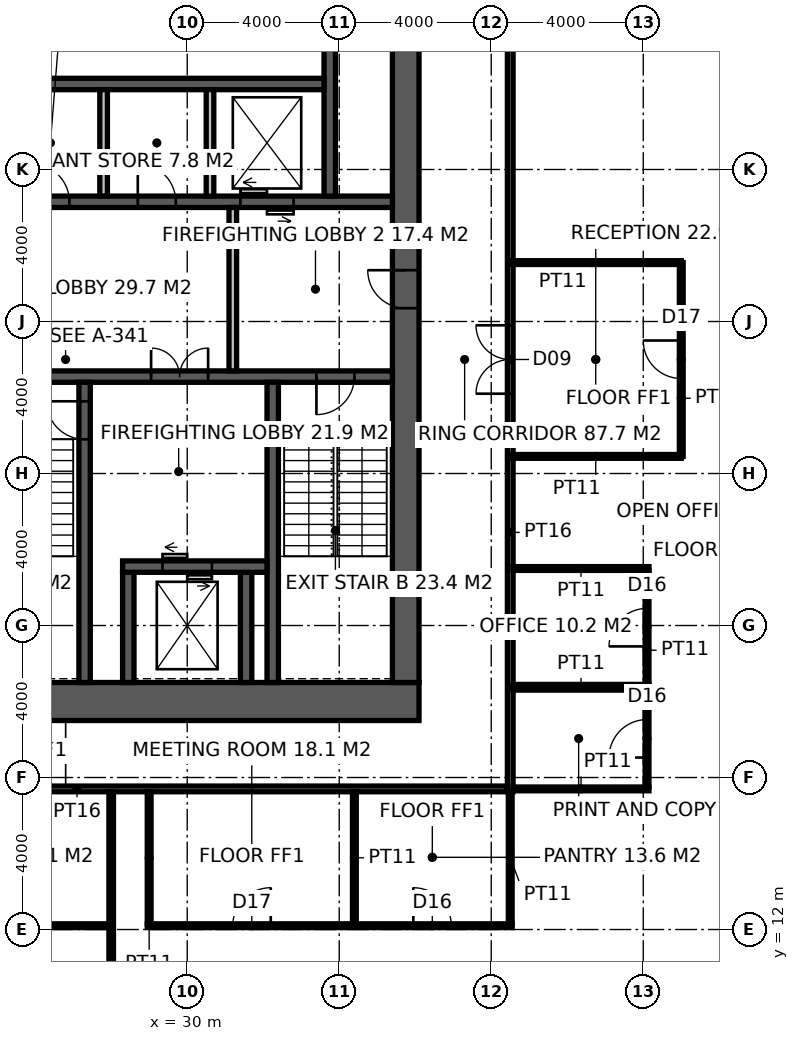
"""IFC4 building model, lengths in metres.
Left out: names, types, materials, properties, quantities, classifications, styles, units other than length and angle.
Written with IfcOpenShell. Run it as: python <this file> out.ifc"""

import sys

from ifc_helpers import new_model, si_unit, direction, frame, frame_2d, origin, place, context, subcontext, project, spatial, rectangle, extrude, element, fill, save


model = new_model("IFC4")
c1 = context("Model", 3, precision=1e-05, world=origin(), true_north=direction((0.0, 1.0)))
c2 = subcontext(c1, "Body", "Model", "MODEL_VIEW")
j1 = project(units=[si_unit("LENGTHUNIT", "METRE"), si_unit("PLANEANGLEUNIT", "RADIAN")], contexts=[c1])
p1 = place(None, origin())
s1 = spatial("IfcSite", under=j1, at=p1, CompositionType="ELEMENT")
p2 = place(p1, origin())
s2 = spatial("IfcBuilding", under=s1, at=p2, CompositionType="ELEMENT")
p3 = place(p2, frame((0.0, 0.0, 266.2)))
s3 = spatial("IfcBuildingStorey", under=s2, at=p3, CompositionType="ELEMENT", Elevation=266.2)
p4 = place(p3, frame((18.5, 18.0, -0.15), z_axis=(0.0, 0.0, 1.0), x_axis=(1.0, 0.0, 0.0)))
e1 = element("IfcWall", 1, at=p4, inside=s3, PredefinedType="SHEAR", context=c2, shape_type="SweptSolid", body=[
    extrude(rectangle(XDim=17.6, YDim=1.0, at=frame_2d((8.8, 0.0))), origin(), (0.0, 0.0, 1.0), 4.0),
])
p5 = place(p4, frame((3.45, 0.0, 0.15)))
e2 = element("IfcOpeningElement", 2, at=p5, cuts=e1, PredefinedType="OPENING", context=c2, shape_type="SweptSolid", body=[
    extrude(rectangle(XDim=1.5, YDim=2.4, at=frame_2d((0.75, 1.2))), frame((0.0, 0.51, 0.0), z_axis=(0.0, -1.0, 0.0), x_axis=(1.0, 0.0, 0.0)), (0.0, 0.0, 1.0), 1.02),
])
p6 = place(p3, frame((35.75, 18.5, -0.15), z_axis=(0.0, 0.0, 1.0), x_axis=(0.0, 1.0, 0.0)))
e3 = element("IfcWall", 3, at=p6, inside=s3, PredefinedType="SHEAR", context=c2, shape_type="SweptSolid", body=[
    extrude(rectangle(XDim=17.0, YDim=0.7, at=frame_2d((8.5, 0.0))), origin(), (0.0, 0.0, 1.0), 4.0),
])
p7 = place(p6, frame((9.85, 0.0, 0.15)))
e4 = element("IfcOpeningElement", 4, at=p7, cuts=e3, PredefinedType="OPENING", context=c2, shape_type="SweptSolid", body=[
    extrude(rectangle(XDim=1.0, YDim=2.2, at=frame_2d((0.5, 1.1))), frame((0.0, 0.36, 0.0), z_axis=(0.0, -1.0, 0.0), x_axis=(1.0, 0.0, 0.0)), (0.0, 0.0, 1.0), 0.72),
])
p8 = place(p3, frame((24.15, 26.55, -0.15), z_axis=(0.0, 0.0, 1.0), x_axis=(1.0, 0.0, 0.0)))
e5 = element("IfcWall", 5, at=p8, inside=s3, PredefinedType="SHEAR", context=c2, shape_type="SweptSolid", body=[
    extrude(rectangle(XDim=11.25, YDim=0.3, at=frame_2d((5.625, 0.0))), origin(), (0.0, 0.0, 1.0), 4.0),
])
p9 = place(p8, frame((9.25, 0.0, 0.15)))
e6 = element("IfcOpeningElement", 6, at=p9, cuts=e5, PredefinedType="OPENING", context=c2, shape_type="SweptSolid", body=[
    extrude(rectangle(XDim=1.0, YDim=2.2, at=frame_2d((0.5, 1.1))), frame((0.0, 0.16, 0.0), z_axis=(0.0, -1.0, 0.0), x_axis=(1.0, 0.0, 0.0)), (0.0, 0.0, 1.0), 0.32),
])
p10 = place(p8, frame((4.9, 0.0, 0.15)))
e7 = element("IfcOpeningElement", 7, at=p10, cuts=e5, PredefinedType="OPENING", context=c2, shape_type="SweptSolid", body=[
    extrude(rectangle(XDim=1.5, YDim=2.4, at=frame_2d((0.75, 1.2))), frame((0.0, 0.16, 0.0), z_axis=(0.0, -1.0, 0.0), x_axis=(1.0, 0.0, 0.0)), (0.0, 0.0, 1.0), 0.32),
])
p11 = place(p3, frame((27.3, 18.5, -0.15), z_axis=(0.0, 0.0, 1.0), x_axis=(0.0, 1.0, 0.0)))
e8 = element("IfcWall", 8, at=p11, inside=s3, PredefinedType="SHEAR", context=c2, shape_type="SweptSolid", body=[
    extrude(rectangle(XDim=7.9, YDim=0.3, at=frame_2d((3.95, 0.0))), origin(), (0.0, 0.0, 1.0), 4.0),
])
p12 = place(p11, frame((6.4, 0.0, 0.15)))
e9 = element("IfcOpeningElement", 9, at=p12, cuts=e8, PredefinedType="OPENING", context=c2, shape_type="SweptSolid", body=[
    extrude(rectangle(XDim=1.0, YDim=2.2, at=frame_2d((0.5, 1.1))), frame((0.0, 0.16, 0.0), z_axis=(0.0, -1.0, 0.0), x_axis=(1.0, 0.0, 0.0)), (0.0, 0.0, 1.0), 0.32),
])
p13 = place(p3, frame((32.25, 18.5, -0.15), z_axis=(0.0, 0.0, 1.0), x_axis=(0.0, 1.0, 0.0)))
e10 = element("IfcWall", 10, at=p13, inside=s3, PredefinedType="SHEAR", context=c2, shape_type="SweptSolid", body=[
    extrude(rectangle(XDim=7.9, YDim=0.3, at=frame_2d((3.95, 0.0))), origin(), (0.0, 0.0, 1.0), 4.0),
])
for number, where, z_axis, x_axis in (
    (11, (28.45, 18.5, -0.15), (0.0, 0.0, 1.0), (0.0, 1.0, 0.0)),
    (12, (31.55, 18.5, -0.15), (0.0, 0.0, 1.0), (0.0, 1.0, 0.0)),
):
    element("IfcWall", number, at=place(p3, frame(where, z_axis=z_axis, x_axis=x_axis)), inside=s3, PredefinedType="SHEAR", context=c2, shape_type="SweptSolid", body=[
        extrude(rectangle(XDim=2.9, YDim=0.3, at=frame_2d((1.45, 0.0))), origin(), (0.0, 0.0, 1.0), 4.0),
    ])
p14 = place(p3, frame((28.3, 21.55, -0.15), z_axis=(0.0, 0.0, 1.0), x_axis=(1.0, 0.0, 0.0)))
e13 = element("IfcWall", 13, at=p14, inside=s3, PredefinedType="SHEAR", context=c2, shape_type="SweptSolid", body=[
    extrude(rectangle(XDim=3.8, YDim=0.3, at=frame_2d((1.9, 0.0))), origin(), (0.0, 0.0, 1.0), 4.0),
])
p15 = place(p14, frame((1.05, 0.0, 0.15)))
e14 = element("IfcOpeningElement", 14, at=p15, cuts=e13, PredefinedType="OPENING", context=c2, shape_type="SweptSolid", body=[
    extrude(rectangle(XDim=1.3, YDim=2.4, at=frame_2d((0.65, 1.2))), frame((0.0, 0.16, 0.0), z_axis=(0.0, -1.0, 0.0), x_axis=(1.0, 0.0, 0.0)), (0.0, 0.0, 1.0), 0.32),
])
p16 = place(p3, frame((24.15, 31.15, -0.15), z_axis=(0.0, 0.0, 1.0), x_axis=(1.0, 0.0, 0.0)))
e15 = element("IfcWall", 15, at=p16, inside=s3, PredefinedType="SHEAR", context=c2, shape_type="SweptSolid", body=[
    extrude(rectangle(XDim=11.25, YDim=0.3, at=frame_2d((5.625, 0.0))), origin(), (0.0, 0.0, 1.0), 4.0),
])
p17 = place(p16, frame((1.75, 0.0, 0.15)))
e16 = element("IfcOpeningElement", 16, at=p17, cuts=e15, PredefinedType="OPENING", context=c2, shape_type="SweptSolid", body=[
    extrude(rectangle(XDim=1.0, YDim=2.2, at=frame_2d((0.5, 1.1))), frame((0.0, 0.16, 0.0), z_axis=(0.0, -1.0, 0.0), x_axis=(1.0, 0.0, 0.0)), (0.0, 0.0, 1.0), 0.32),
])
p18 = place(p16, frame((4.55, 0.0, 0.15)))
e17 = element("IfcOpeningElement", 17, at=p18, cuts=e15, PredefinedType="OPENING", context=c2, shape_type="SweptSolid", body=[
    extrude(rectangle(XDim=1.0, YDim=2.2, at=frame_2d((0.5, 1.1))), frame((0.0, 0.16, 0.0), z_axis=(0.0, -1.0, 0.0), x_axis=(1.0, 0.0, 0.0)), (0.0, 0.0, 1.0), 0.32),
])
p19 = place(p16, frame((7.25, 0.0, 0.15)))
e18 = element("IfcOpeningElement", 18, at=p19, cuts=e15, PredefinedType="OPENING", context=c2, shape_type="SweptSolid", body=[
    extrude(rectangle(XDim=1.4, YDim=2.4, at=frame_2d((0.7, 1.2))), frame((0.0, 0.16, 0.0), z_axis=(0.0, -1.0, 0.0), x_axis=(1.0, 0.0, 0.0)), (0.0, 0.0, 1.0), 0.32),
])
p20 = place(p3, frame((33.75, 31.3, -0.15), z_axis=(0.0, 0.0, 1.0), x_axis=(0.0, 1.0, 0.0)))
e19 = element("IfcWall", 19, at=p20, inside=s3, PredefinedType="SHEAR", context=c2, shape_type="SweptSolid", body=[
    extrude(rectangle(XDim=4.2, YDim=0.3, at=frame_2d((2.1, 0.0))), origin(), (0.0, 0.0, 1.0), 4.0),
])
p21 = place(p3, frame((25.0, 34.25, -0.15), z_axis=(0.0, 0.0, 1.0), x_axis=(1.0, 0.0, 0.0)))
e20 = element("IfcWall", 20, at=p21, inside=s3, PredefinedType="SHEAR", context=c2, shape_type="SweptSolid", body=[
    extrude(rectangle(XDim=8.6, YDim=0.3, at=frame_2d((4.3, 0.0))), origin(), (0.0, 0.0, 1.0), 4.0),
])
p22 = place(p3, frame((27.8, 31.3, 0.0), z_axis=(0.0, 0.0, 1.0), x_axis=(0.0, 1.0, 0.0)))
e21 = element("IfcWall", 21, at=p22, inside=s3, PredefinedType="SOLIDWALL", context=c2, shape_type="SweptSolid", body=[
    extrude(rectangle(XDim=2.8, YDim=0.2, at=frame_2d((1.4, 0.0))), origin(), (0.0, 0.0, 1.0), 3.85),
])
p23 = place(p3, frame((30.6, 31.3, -0.15), z_axis=(0.0, 0.0, 1.0), x_axis=(0.0, 1.0, 0.0)))
e22 = element("IfcWall", 22, at=p23, inside=s3, PredefinedType="SOLIDWALL", context=c2, shape_type="SweptSolid", body=[
    extrude(rectangle(XDim=2.8, YDim=0.2, at=frame_2d((1.4, 0.0))), origin(), (0.0, 0.0, 1.0), 4.0),
])
p24 = place(p3, frame((31.2, 26.7, 0.0), z_axis=(0.0, 0.0, 1.0), x_axis=(0.0, 1.0, 0.0)))
e23 = element("IfcWall", 23, at=p24, inside=s3, PredefinedType="SOLIDWALL", context=c2, shape_type="SweptSolid", body=[
    extrude(rectangle(XDim=4.3, YDim=0.2, at=frame_2d((2.15, 0.0))), origin(), (0.0, 0.0, 1.0), 3.85),
])
p25 = place(p3, frame((38.5, 15.625, 0.0), z_axis=(0.0, 0.0, 1.0), x_axis=(0.0, 1.0, 0.0)))
e24 = element("IfcWall", 24, at=p25, inside=s3, PredefinedType="PARTITIONING", context=c2, shape_type="SweptSolid", body=[
    extrude(rectangle(XDim=22.75, YDim=0.15, at=frame_2d((11.375, 0.0))), origin(), (0.0, 0.0, 1.0), 2.65),
])
p26 = place(p25, frame((10.475, 0.0, 0.0)))
e25 = element("IfcOpeningElement", 25, at=p26, cuts=e24, PredefinedType="OPENING", context=c2, shape_type="SweptSolid", body=[
    extrude(rectangle(XDim=1.8, YDim=2.4, at=frame_2d((0.9, 1.2))), frame((0.0, 0.085, 0.0), z_axis=(0.0, -1.0, 0.0), x_axis=(1.0, 0.0, 0.0)), (0.0, 0.0, 1.0), 0.17),
])
p27 = place(p3, frame((15.775, 15.7, 0.0), z_axis=(0.0, 0.0, 1.0), x_axis=(1.0, 0.0, 0.0)))
e26 = element("IfcWall", 26, at=p27, inside=s3, PredefinedType="PARTITIONING", context=c2, shape_type="SweptSolid", body=[
    extrude(rectangle(XDim=22.65, YDim=0.15, at=frame_2d((11.325, 0.0))), origin(), (0.0, 0.0, 1.0), 3.85),
])
p28 = place(p3, frame((28.0, 4.3, 0.0), z_axis=(0.0, 0.0, 1.0), x_axis=(0.0, 1.0, 0.0)))
e27 = element("IfcWall", 27, at=p28, inside=s3, PredefinedType="PARTITIONING", context=c2, shape_type="SweptSolid", body=[
    extrude(rectangle(XDim=11.325, YDim=0.12, at=frame_2d((5.663, 0.0))), origin(), (0.0, 0.0, 1.0), 3.85),
])
p29 = place(p3, frame((15.65, 12.1, 0.0), z_axis=(0.0, 0.0, 1.0), x_axis=(1.0, 0.0, 0.0)))
e28 = element("IfcWall", 28, at=p29, inside=s3, PredefinedType="PARTITIONING", context=c2, shape_type="SweptSolid", body=[
    extrude(rectangle(XDim=12.289, YDim=0.1, at=frame_2d((6.145, 0.0))), origin(), (0.0, 0.0, 1.0), 3.85),
])
p30 = place(p29, frame((2.75, 0.0, 0.0)))
e29 = element("IfcOpeningElement", 29, at=p30, cuts=e28, PredefinedType="OPENING", context=c2, shape_type="SweptSolid", body=[
    extrude(rectangle(XDim=1.8, YDim=2.4, at=frame_2d((0.9, 1.2))), frame((0.0, 0.06, 0.0), z_axis=(0.0, -1.0, 0.0), x_axis=(1.0, 0.0, 0.0)), (0.0, 0.0, 1.0), 0.12),
])
p31 = place(p29, frame((9.3, 0.0, 0.0)))
e30 = element("IfcOpeningElement", 30, at=p31, cuts=e28, PredefinedType="OPENING", context=c2, shape_type="SweptSolid", body=[
    extrude(rectangle(XDim=1.0, YDim=2.2, at=frame_2d((0.5, 1.1))), frame((0.0, 0.06, 0.0), z_axis=(0.0, -1.0, 0.0), x_axis=(1.0, 0.0, 0.0)), (0.0, 0.0, 1.0), 0.12),
])
p32 = place(p3, frame((28.949, 12.1, 0.0), z_axis=(0.0, 0.0, 1.0), x_axis=(1.0, 0.0, 0.0)))
e31 = element("IfcWall", 31, at=p32, inside=s3, PredefinedType="PARTITIONING", context=c2, shape_type="SweptSolid", body=[
    extrude(rectangle(XDim=9.601, YDim=0.1, at=frame_2d((4.801, 0.0))), origin(), (0.0, 0.0, 1.0), 3.85),
])
p33 = place(p32, frame((2.25, 0.0, 0.0)))
e32 = element("IfcOpeningElement", 32, at=p33, cuts=e31, PredefinedType="OPENING", context=c2, shape_type="SweptSolid", body=[
    extrude(rectangle(XDim=1.0, YDim=2.2, at=frame_2d((0.5, 1.1))), frame((0.0, 0.06, 0.0), z_axis=(0.0, -1.0, 0.0), x_axis=(1.0, 0.0, 0.0)), (0.0, 0.0, 1.0), 0.12),
])
p34 = place(p32, frame((7.0, 0.0, 0.0)))
e33 = element("IfcOpeningElement", 33, at=p34, cuts=e31, PredefinedType="OPENING", context=c2, shape_type="SweptSolid", body=[
    extrude(rectangle(XDim=1.0, YDim=2.2, at=frame_2d((0.5, 1.1))), frame((0.0, 0.06, 0.0), z_axis=(0.0, -1.0, 0.0), x_axis=(1.0, 0.0, 0.0)), (0.0, 0.0, 1.0), 0.12),
])
for number, where, z_axis, x_axis in (
    (34, (38.575, 15.7, 0.0), (0.0, 0.0, 1.0), (1.0, 0.0, 0.0)),
    (35, (38.575, 18.35, 0.0), (0.0, 0.0, 1.0), (1.0, 0.0, 0.0)),
    (36, (38.575, 18.4, 0.0), (0.0, 0.0, 1.0), (1.0, 0.0, 0.0)),
    (37, (38.575, 21.5, 0.0), (0.0, 0.0, 1.0), (1.0, 0.0, 0.0)),
):
    element("IfcWall", number, at=place(p3, frame(where, z_axis=z_axis, x_axis=x_axis)), inside=s3, PredefinedType="PARTITIONING", context=c2, shape_type="SweptSolid", body=[
        extrude(rectangle(XDim=3.575, YDim=0.1, at=frame_2d((1.788, 0.0))), origin(), (0.0, 0.0, 1.0), 3.85),
    ])
for number, where, z_axis, x_axis in (
    (38, (28.999, 12.15, 0.0), (0.0, 0.0, 1.0), (0.0, 1.0, 0.0)),
    (39, (34.399, 12.15, 0.0), (0.0, 0.0, 1.0), (0.0, 1.0, 0.0)),
    (40, (38.5, 12.15, 0.0), (0.0, 0.0, 1.0), (0.0, 1.0, 0.0)),
):
    element("IfcWall", number, at=place(p3, frame(where, z_axis=z_axis, x_axis=x_axis)), inside=s3, PredefinedType="PARTITIONING", context=c2, shape_type="SweptSolid", body=[
        extrude(rectangle(XDim=3.475, YDim=0.1, at=frame_2d((1.738, 0.0))), origin(), (0.0, 0.0, 1.0), 3.85),
    ])
p35 = place(p3, frame((42.1, 15.75, 0.0), z_axis=(0.0, 0.0, 1.0), x_axis=(0.0, 1.0, 0.0)))
e41 = element("IfcWall", 41, at=p35, inside=s3, PredefinedType="PARTITIONING", context=c2, shape_type="SweptSolid", body=[
    extrude(rectangle(XDim=2.55, YDim=0.1, at=frame_2d((1.275, 0.0))), origin(), (0.0, 0.0, 1.0), 2.95),
])
p36 = place(p35, frame((0.775, 0.0, 0.0)))
e42 = element("IfcOpeningElement", 42, at=p36, cuts=e41, PredefinedType="OPENING", context=c2, shape_type="SweptSolid", body=[
    extrude(rectangle(XDim=1.0, YDim=2.2, at=frame_2d((0.5, 1.1))), frame((0.0, 0.06, 0.0), z_axis=(0.0, -1.0, 0.0), x_axis=(1.0, 0.0, 0.0)), (0.0, 0.0, 1.0), 0.12),
])
p37 = place(p3, frame((42.1, 18.45, 0.0), z_axis=(0.0, 0.0, 1.0), x_axis=(0.0, 1.0, 0.0)))
e43 = element("IfcWall", 43, at=p37, inside=s3, PredefinedType="PARTITIONING", context=c2, shape_type="SweptSolid", body=[
    extrude(rectangle(XDim=3.0, YDim=0.1, at=frame_2d((1.5, 0.0))), origin(), (0.0, 0.0, 1.0), 2.95),
])
p38 = place(p37, frame((1.0, 0.0, 0.0)))
e44 = element("IfcOpeningElement", 44, at=p38, cuts=e43, PredefinedType="OPENING", context=c2, shape_type="SweptSolid", body=[
    extrude(rectangle(XDim=1.0, YDim=2.2, at=frame_2d((0.5, 1.1))), frame((0.0, 0.06, 0.0), z_axis=(0.0, -1.0, 0.0), x_axis=(1.0, 0.0, 0.0)), (0.0, 0.0, 1.0), 0.12),
])
p39 = place(p3, frame((38.5, 24.45, 0.0), z_axis=(0.0, 0.0, 1.0), x_axis=(1.0, 0.0, 0.0)))
e45 = element("IfcWall", 45, at=p39, inside=s3, PredefinedType="PARTITIONING", context=c2, shape_type="SweptSolid", body=[
    extrude(rectangle(XDim=4.5, YDim=0.1, at=frame_2d((2.25, 0.0))), origin(), (0.0, 0.0, 1.0), 2.65),
])
p40 = place(p3, frame((43.0, 24.45, 0.0), z_axis=(0.0, 0.0, 1.0), x_axis=(0.0, 1.0, 0.0)))
e46 = element("IfcWall", 46, at=p40, inside=s3, PredefinedType="PARTITIONING", context=c2, shape_type="SweptSolid", body=[
    extrude(rectangle(XDim=5.1, YDim=0.1, at=frame_2d((2.55, 0.0))), origin(), (0.0, 0.0, 1.0), 3.85),
])
p41 = place(p40, frame((2.05, 0.0, 0.0)))
e47 = element("IfcOpeningElement", 47, at=p41, cuts=e46, PredefinedType="OPENING", context=c2, shape_type="SweptSolid", body=[
    extrude(rectangle(XDim=1.0, YDim=2.2, at=frame_2d((0.5, 1.1))), frame((0.0, 0.06, 0.0), z_axis=(0.0, -1.0, 0.0), x_axis=(1.0, 0.0, 0.0)), (0.0, 0.0, 1.0), 0.12),
])
p42 = place(p3, frame((43.0, 29.55, 0.0), z_axis=(0.0, 0.0, 1.0), x_axis=(-1.0, 0.0, 0.0)))
e48 = element("IfcWall", 48, at=p42, inside=s3, PredefinedType="PARTITIONING", context=c2, shape_type="SweptSolid", body=[
    extrude(rectangle(XDim=4.5, YDim=0.1, at=frame_2d((2.25, 0.0))), origin(), (0.0, 0.0, 1.0), 3.85),
])
p43 = place(p12, origin())
e49 = element("IfcDoor", 49, at=p43, inside=s3, OperationType="SINGLE_SWING_RIGHT", PredefinedType="DOOR", context=c2, shape_type="SweptSolid", body=[
    extrude(rectangle(XDim=1.0, YDim=2.2, at=frame_2d((0.5, 1.1))), frame((0.0, 0.025, 0.0), z_axis=(0.0, -1.0, 0.0), x_axis=(1.0, 0.0, 0.0)), (0.0, 0.0, 1.0), 0.05),
])
fill(e9, e49)
p44 = place(p9, frame((1.0, 0.0, 0.0), z_axis=(0.0, 0.0, 1.0), x_axis=(-1.0, 0.0, 0.0)))
e50 = element("IfcDoor", 50, at=p44, inside=s3, OperationType="SINGLE_SWING_RIGHT", PredefinedType="DOOR", context=c2, shape_type="SweptSolid", body=[
    extrude(rectangle(XDim=1.0, YDim=2.2, at=frame_2d((0.5, 1.1))), frame((0.0, 0.025, 0.0), z_axis=(0.0, -1.0, 0.0), x_axis=(1.0, 0.0, 0.0)), (0.0, 0.0, 1.0), 0.05),
])
fill(e6, e50)
p45 = place(p7, origin())
e51 = element("IfcDoor", 51, at=p45, inside=s3, OperationType="SINGLE_SWING_RIGHT", PredefinedType="DOOR", context=c2, shape_type="SweptSolid", body=[
    extrude(rectangle(XDim=1.0, YDim=2.2, at=frame_2d((0.5, 1.1))), frame((0.0, 0.025, 0.0), z_axis=(0.0, -1.0, 0.0), x_axis=(1.0, 0.0, 0.0)), (0.0, 0.0, 1.0), 0.05),
])
fill(e4, e51)
p46 = place(p10, origin())
e52 = element("IfcDoor", 52, at=p46, inside=s3, OperationType="DOUBLE_DOOR_DOUBLE_SWING", PredefinedType="DOOR", context=c2, shape_type="SweptSolid", body=[
    extrude(rectangle(XDim=1.5, YDim=2.4, at=frame_2d((0.75, 1.2))), frame((0.0, 0.025, 0.0), z_axis=(0.0, -1.0, 0.0), x_axis=(1.0, 0.0, 0.0)), (0.0, 0.0, 1.0), 0.05),
])
fill(e7, e52)
p47 = place(p17, origin())
e53 = element("IfcDoor", 53, at=p47, inside=s3, OperationType="SINGLE_SWING_LEFT", PredefinedType="DOOR", context=c2, shape_type="SweptSolid", body=[
    extrude(rectangle(XDim=1.0, YDim=2.2, at=frame_2d((0.5, 1.1))), frame((0.0, 0.025, 0.0), z_axis=(0.0, -1.0, 0.0), x_axis=(1.0, 0.0, 0.0)), (0.0, 0.0, 1.0), 0.05),
])
fill(e16, e53)
p48 = place(p18, origin())
e54 = element("IfcDoor", 54, at=p48, inside=s3, OperationType="SINGLE_SWING_LEFT", PredefinedType="DOOR", context=c2, shape_type="SweptSolid", body=[
    extrude(rectangle(XDim=1.0, YDim=2.2, at=frame_2d((0.5, 1.1))), frame((0.0, 0.025, 0.0), z_axis=(0.0, -1.0, 0.0), x_axis=(1.0, 0.0, 0.0)), (0.0, 0.0, 1.0), 0.05),
])
fill(e17, e54)
p49 = place(p26, origin())
e55 = element("IfcDoor", 55, at=p49, inside=s3, OperationType="DOUBLE_DOOR_DOUBLE_SWING", PredefinedType="DOOR", context=c2, shape_type="SweptSolid", body=[
    extrude(rectangle(XDim=1.8, YDim=2.4, at=frame_2d((0.9, 1.2))), frame((0.0, 0.025, 0.0), z_axis=(0.0, -1.0, 0.0), x_axis=(1.0, 0.0, 0.0)), (0.0, 0.0, 1.0), 0.05),
])
fill(e25, e55)
p50 = place(p33, origin())
e56 = element("IfcDoor", 56, at=p50, inside=s3, OperationType="SINGLE_SWING_RIGHT", PredefinedType="DOOR", context=c2, shape_type="SweptSolid", body=[
    extrude(rectangle(XDim=1.0, YDim=2.2, at=frame_2d((0.5, 1.1))), frame((0.0, 0.025, 0.0), z_axis=(0.0, -1.0, 0.0), x_axis=(1.0, 0.0, 0.0)), (0.0, 0.0, 1.0), 0.05),
])
fill(e32, e56)
p51 = place(p34, origin())
e57 = element("IfcDoor", 57, at=p51, inside=s3, OperationType="SINGLE_SWING_LEFT", PredefinedType="DOOR", context=c2, shape_type="SweptSolid", body=[
    extrude(rectangle(XDim=1.0, YDim=2.2, at=frame_2d((0.5, 1.1))), frame((0.0, 0.025, 0.0), z_axis=(0.0, -1.0, 0.0), x_axis=(1.0, 0.0, 0.0)), (0.0, 0.0, 1.0), 0.05),
])
fill(e33, e57)
p52 = place(p36, origin())
e58 = element("IfcDoor", 58, at=p52, inside=s3, OperationType="SINGLE_SWING_LEFT", PredefinedType="DOOR", context=c2, shape_type="SweptSolid", body=[
    extrude(rectangle(XDim=1.0, YDim=2.2, at=frame_2d((0.5, 1.1))), frame((0.0, 0.025, 0.0), z_axis=(0.0, -1.0, 0.0), x_axis=(1.0, 0.0, 0.0)), (0.0, 0.0, 1.0), 0.05),
])
fill(e42, e58)
p53 = place(p38, origin())
e59 = element("IfcDoor", 59, at=p53, inside=s3, OperationType="SINGLE_SWING_LEFT", PredefinedType="DOOR", context=c2, shape_type="SweptSolid", body=[
    extrude(rectangle(XDim=1.0, YDim=2.2, at=frame_2d((0.5, 1.1))), frame((0.0, 0.025, 0.0), z_axis=(0.0, -1.0, 0.0), x_axis=(1.0, 0.0, 0.0)), (0.0, 0.0, 1.0), 0.05),
])
fill(e44, e59)
p54 = place(p41, origin())
e60 = element("IfcDoor", 60, at=p54, inside=s3, OperationType="SINGLE_SWING_RIGHT", PredefinedType="DOOR", context=c2, shape_type="SweptSolid", body=[
    extrude(rectangle(XDim=1.0, YDim=2.2, at=frame_2d((0.5, 1.1))), frame((0.0, 0.025, 0.0), z_axis=(0.0, -1.0, 0.0), x_axis=(1.0, 0.0, 0.0)), (0.0, 0.0, 1.0), 0.05),
])
fill(e47, e60)
p55 = place(p15, origin())
e61 = element("IfcDoor", 61, at=p55, inside=s3, OperationType="DOUBLE_DOOR_SLIDING", PredefinedType="DOOR", context=c2, shape_type="SweptSolid", body=[
    extrude(rectangle(XDim=1.3, YDim=2.4, at=frame_2d((0.65, 1.2))), frame((0.0, 0.025, 0.0), z_axis=(0.0, -1.0, 0.0), x_axis=(1.0, 0.0, 0.0)), (0.0, 0.0, 1.0), 0.05),
])
fill(e14, e61)
p56 = place(p19, origin())
e62 = element("IfcDoor", 62, at=p56, inside=s3, OperationType="DOUBLE_DOOR_SLIDING", PredefinedType="DOOR", context=c2, shape_type="SweptSolid", body=[
    extrude(rectangle(XDim=1.4, YDim=2.4, at=frame_2d((0.7, 1.2))), frame((0.0, 0.025, 0.0), z_axis=(0.0, -1.0, 0.0), x_axis=(1.0, 0.0, 0.0)), (0.0, 0.0, 1.0), 0.05),
])
fill(e18, e62)
save(model, sys.argv[1])
